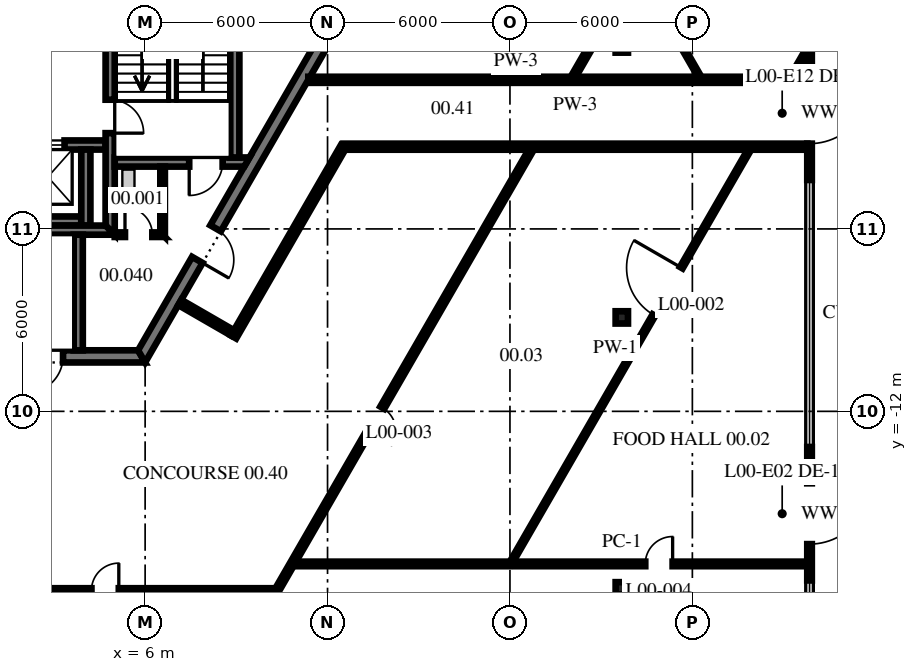
"""IFC4 building model, lengths in metres.
Left out: names, types, materials, properties, quantities, classifications, styles, units other than length and angle.
Written with IfcOpenShell. Run it as: python <this file> out.ifc"""

import sys

from ifc_helpers import new_model, si_unit, direction, frame, frame_2d, origin, origin_2d, place, context, subcontext, project, spatial, polyline, rectangle, i_section, outline, extrude, source, transform, mapped, element, fill, save


model = new_model("IFC4")
c1 = context("Model", 3, precision=1e-05, world=origin(), true_north=direction((0.0, 1.0)))
c2 = subcontext(c1, "Body", "Model", "MODEL_VIEW")
j1 = project(units=[si_unit("LENGTHUNIT", "METRE"), si_unit("PLANEANGLEUNIT", "RADIAN")], contexts=[c1])
p1 = place(None, origin())
s1 = spatial("IfcSite", under=j1, at=p1, CompositionType="ELEMENT")
p2 = place(p1, origin())
s2 = spatial("IfcBuilding", under=s1, at=p2, CompositionType="ELEMENT")
p3 = place(p2, origin())
s3 = spatial("IfcBuildingStorey", under=s2, at=p3, CompositionType="ELEMENT", Elevation=0.0)
m1 = source(origin(), c2, "Body", "SweptSolid", [
    extrude(i_section(OverallWidth=0.404, OverallDepth=0.406, WebThickness=0.027, FlangeThickness=0.044, at=origin_2d()), origin(), (0.0, 0.0, 1.0), 7.2),
])
for number, where, z_axis, x_axis in (
    (1, (21.679, -17.82, -0.2), (0.0, 0.0, 1.0), (0.0, 1.0, 0.0)),
    (2, (21.679, -8.91, -0.2), (0.0, 0.0, 1.0), (0.0, 1.0, 0.0)),
    (3, (21.679, 0.0, -0.2), (0.0, 0.0, 1.0), (0.0, 1.0, 0.0)),
):
    element("IfcColumn", number, at=place(p3, frame(where, z_axis=z_axis, x_axis=x_axis)), inside=s3, PredefinedType="COLUMN", context=c2, shape_type="MappedRepresentation", body=[
        mapped(m1, transform((0.0, 0.0, 0.0), scale=1.0)),
    ])
m2 = source(origin(), c2, "Body", "SweptSolid", [
    extrude(outline(polyline([(-0.115, -0.2), (11.885, -0.2), (11.654, 0.2), (0.115, 0.2), (-0.115, -0.2)])), origin(), (0.0, 0.0, 1.0), 7.0),
])
p4 = place(p3, frame((-5.885, -10.192, -0.2), z_axis=(0.0, 0.0, 1.0), x_axis=(1.0, 0.0, 0.0)))
e4 = element("IfcWall", 4, at=p4, inside=s3, PredefinedType="SHEAR", context=c2, shape_type="MappedRepresentation", body=[
    mapped(m2, transform((0.0, 0.0, 0.0), scale=1.0)),
])
p5 = place(p4, frame((7.985, 0.0, 0.2)))
e5 = element("IfcOpeningElement", 5, at=p5, cuts=e4, PredefinedType="OPENING", context=c2, shape_type="SweptSolid", body=[
    extrude(rectangle(XDim=1.2, YDim=2.1, at=frame_2d((0.6, 1.05))), frame((0.0, 0.21, 0.0), z_axis=(0.0, -1.0, 0.0), x_axis=(1.0, 0.0, 0.0)), (0.0, 0.0, 1.0), 0.42),
])
p6 = place(p3, frame((5.885, -10.192, -0.2), z_axis=(0.0, 0.0, 1.0), x_axis=(0.499996592174, 0.866027371285, 0.0)))
e6 = element("IfcWall", 6, at=p6, inside=s3, PredefinedType="SHEAR", context=c2, shape_type="MappedRepresentation", body=[
    mapped(m2, transform((0.0, 0.0, 0.0), scale=1.0)),
])
p7 = place(p6, frame((3.665, 0.0, 0.2)))
e7 = element("IfcOpeningElement", 7, at=p7, cuts=e6, PredefinedType="OPENING", context=c2, shape_type="SweptSolid", body=[
    extrude(rectangle(XDim=1.2, YDim=2.1, at=frame_2d((0.6, 1.05))), frame((0.0, 0.21, 0.0), z_axis=(0.0, -1.0, 0.0), x_axis=(1.0, 0.0, 0.0)), (0.0, 0.0, 1.0), 0.42),
])
p8 = place(p3, frame((-8.1, -3.24, -0.2), z_axis=(0.0, 0.0, 1.0), x_axis=(1.0, 0.0, 0.0)))
e8 = element("IfcWall", 8, at=p8, inside=s3, PredefinedType="SHEAR", context=c2, shape_type="SweptSolid", body=[
    extrude(rectangle(XDim=12.8, YDim=0.3, at=frame_2d((6.4, 0.0))), origin(), (0.0, 0.0, 1.0), 7.0),
])
p9 = place(p8, frame((1.613, 0.0, 0.2)))
e9 = element("IfcOpeningElement", 9, at=p9, cuts=e8, PredefinedType="OPENING", context=c2, shape_type="SweptSolid", body=[
    extrude(rectangle(XDim=0.9, YDim=2.1, at=frame_2d((0.45, 1.05))), frame((0.0, 0.16, 0.0), z_axis=(0.0, -1.0, 0.0), x_axis=(1.0, 0.0, 0.0)), (0.0, 0.0, 1.0), 0.32),
])
p10 = place(p8, frame((4.45, 0.0, 0.2)))
e10 = element("IfcOpeningElement", 10, at=p10, cuts=e8, PredefinedType="OPENING", context=c2, shape_type="SweptSolid", body=[
    extrude(rectangle(XDim=0.9, YDim=2.1, at=frame_2d((0.45, 1.05))), frame((0.0, 0.16, 0.0), z_axis=(0.0, -1.0, 0.0), x_axis=(1.0, 0.0, 0.0)), (0.0, 0.0, 1.0), 0.32),
])
p11 = place(p8, frame((7.288, 0.0, 0.2)))
e11 = element("IfcOpeningElement", 11, at=p11, cuts=e8, PredefinedType="OPENING", context=c2, shape_type="SweptSolid", body=[
    extrude(rectangle(XDim=0.9, YDim=2.1, at=frame_2d((0.45, 1.05))), frame((0.0, 0.16, 0.0), z_axis=(0.0, -1.0, 0.0), x_axis=(1.0, 0.0, 0.0)), (0.0, 0.0, 1.0), 0.32),
])
p12 = place(p8, frame((10.35, 0.0, 0.2)))
e12 = element("IfcOpeningElement", 12, at=p12, cuts=e8, PredefinedType="OPENING", context=c2, shape_type="SweptSolid", body=[
    extrude(rectangle(XDim=1.1, YDim=2.1, at=frame_2d((0.55, 1.05))), frame((0.0, 0.16, 0.0), z_axis=(0.0, -1.0, 0.0), x_axis=(1.0, 0.0, 0.0)), (0.0, 0.0, 1.0), 0.32),
])
p13 = place(p3, frame((-8.1, -5.74, -0.2), z_axis=(0.0, 0.0, 1.0), x_axis=(1.0, 0.0, 0.0)))
e13 = element("IfcWall", 13, at=p13, inside=s3, PredefinedType="SHEAR", context=c2, shape_type="SweptSolid", body=[
    extrude(outline(polyline([(12.0, -0.15), (-0.04, -0.15), (-0.213, 0.15), (12.0, 0.15), (12.0, -0.15)])), origin(), (0.0, 0.0, 1.0), 7.0),
])
m3 = source(origin(), c2, "Body", "SweptSolid", [
    extrude(rectangle(XDim=2.5, YDim=0.3, at=frame_2d((1.25, 0.0))), origin(), (0.0, 0.0, 1.0), 7.0),
])
p14 = place(p3, frame((4.05, -5.89, -0.2), z_axis=(0.0, 0.0, 1.0), x_axis=(0.0, 1.0, 0.0)))
e14 = element("IfcWall", 14, at=p14, inside=s3, PredefinedType="SHEAR", context=c2, shape_type="MappedRepresentation", body=[
    mapped(m3, transform((0.0, 0.0, 0.0), scale=1.0)),
])
p15 = place(p3, frame((4.85, -6.04, -0.2), z_axis=(0.0, 0.0, 1.0), x_axis=(0.0, 1.0, 0.0)))
e15 = element("IfcWall", 15, at=p15, inside=s3, PredefinedType="SHEAR", context=c2, shape_type="SweptSolid", body=[
    extrude(outline(polyline([(-0.15, -0.15), (9.99, -0.15), (9.99, 0.15), (0.15, 0.15), (-0.15, -0.15)])), origin(), (0.0, 0.0, 1.0), 7.0),
])
p16 = place(p15, frame((3.19, 0.0, 0.2)))
e16 = element("IfcOpeningElement", 16, at=p16, cuts=e15, PredefinedType="OPENING", context=c2, shape_type="SweptSolid", body=[
    extrude(rectangle(XDim=1.1, YDim=2.1, at=frame_2d((0.55, 1.05))), frame((0.0, 0.16, 0.0), z_axis=(0.0, -1.0, 0.0), x_axis=(1.0, 0.0, 0.0)), (0.0, 0.0, 1.0), 0.32),
])
p17 = place(p3, frame((5.0, -3.8, -0.2), z_axis=(0.0, 0.0, 1.0), x_axis=(1.0, 0.0, 0.0)))
e17 = element("IfcWall", 17, at=p17, inside=s3, PredefinedType="SHEAR", context=c2, shape_type="SweptSolid", body=[
    extrude(outline(polyline([(0.0, -0.15), (0.0, 0.15), (4.433, 0.15), (4.26, -0.15), (0.0, -0.15)])), origin(), (0.0, 0.0, 1.0), 7.0),
])
p18 = place(p17, frame((2.45, 0.0, 0.2)))
e18 = element("IfcOpeningElement", 18, at=p18, cuts=e17, PredefinedType="OPENING", context=c2, shape_type="SweptSolid", body=[
    extrude(rectangle(XDim=1.1, YDim=2.1, at=frame_2d((0.55, 1.05))), frame((0.0, 0.16, 0.0), z_axis=(0.0, -1.0, 0.0), x_axis=(1.0, 0.0, 0.0)), (0.0, 0.0, 1.0), 0.32),
])
p19 = place(p3, frame((8.95, -3.65, -0.2), z_axis=(0.0, 0.0, 1.0), x_axis=(0.0, 1.0, 0.0)))
e19 = element("IfcWall", 19, at=p19, inside=s3, PredefinedType="SHEAR", context=c2, shape_type="SweptSolid", body=[
    extrude(rectangle(XDim=7.3, YDim=0.3, at=frame_2d((3.65, 0.0))), origin(), (0.0, 0.0, 1.0), 7.0),
])
p20 = place(p3, frame((-3.95, -6.04, -0.2), z_axis=(0.0, 0.0, 1.0), x_axis=(1.0, 0.0, 0.0)))
e20 = element("IfcWall", 20, at=p20, inside=s3, PredefinedType="SHEAR", context=c2, shape_type="SweptSolid", body=[
    extrude(outline(polyline([(0.0, -0.15), (8.95, -0.15), (8.65, 0.15), (0.0, 0.15), (0.0, -0.15)])), origin(), (0.0, 0.0, 1.0), 7.0),
])
m4 = source(origin(), c2, "Body", "SweptSolid", [
    extrude(outline(polyline([(3.8, -0.15), (-0.004, -0.15), (-0.004, 0.15), (3.8, 0.15), (3.8, -0.15)])), origin(), (0.0, 0.0, 1.0), 7.0),
])
p21 = place(p3, frame((3.8, -9.99, -0.2), z_axis=(0.0, 0.0, 1.0), x_axis=(0.0, 1.0, 0.0)))
e21 = element("IfcWall", 21, at=p21, inside=s3, PredefinedType="SHEAR", context=c2, shape_type="MappedRepresentation", body=[
    mapped(m4, transform((0.0, 0.0, 0.0), scale=1.0)),
])
p22 = place(p3, frame((5.0, -6.19, 0.0), z_axis=(0.0, 0.0, 1.0), x_axis=(1.0, 0.0, 0.0)))
e22 = element("IfcWall", 22, at=p22, inside=s3, PredefinedType="PARTITIONING", context=c2, shape_type="SweptSolid", body=[
    extrude(outline(polyline([(0.0, -0.075), (1.65, -0.075), (1.5, 0.075), (0.0, 0.075), (0.0, -0.075)])), origin(), (0.0, 0.0, 1.0), 6.8),
])
p23 = place(p22, frame((0.337, 0.0, 0.0)))
e23 = element("IfcOpeningElement", 23, at=p23, cuts=e22, PredefinedType="OPENING", context=c2, shape_type="SweptSolid", body=[
    extrude(rectangle(XDim=0.9, YDim=2.1, at=frame_2d((0.45, 1.05))), frame((0.0, 0.085, 0.0), z_axis=(0.0, -1.0, 0.0), x_axis=(1.0, 0.0, 0.0)), (0.0, 0.0, 1.0), 0.17),
])
p24 = place(p3, frame((6.575, -6.19, 0.0), z_axis=(0.0, 0.0, 1.0), x_axis=(0.0, 1.0, 0.0)))
e24 = element("IfcWall", 24, at=p24, inside=s3, PredefinedType="PARTITIONING", context=c2, shape_type="SweptSolid", body=[
    extrude(outline(polyline([(-0.075, -0.075), (2.24, -0.075), (2.24, 0.075), (0.075, 0.075), (-0.075, -0.075)])), origin(), (0.0, 0.0, 1.0), 6.8),
])
m5 = source(origin(), c2, "Body", "SweptSolid", [
    extrude(rectangle(XDim=4.39, YDim=0.15, at=frame_2d((2.195, 0.0))), origin(), (0.0, 0.0, 1.0), 6.8),
])
p25 = place(p3, frame((27.854, -13.172, 0.0), z_axis=(0.0, 0.0, 1.0), x_axis=(0.0, -1.0, 0.0)))
e25 = element("IfcWall", 25, at=p25, inside=s3, PredefinedType="ELEMENTEDWALL", context=c2, shape_type="MappedRepresentation", body=[
    mapped(m5, transform((0.0, 0.0, 0.0), scale=1.0)),
])
p26 = place(p25, frame((1.195, 0.0, 0.0)))
e26 = element("IfcOpeningElement", 26, at=p26, cuts=e25, PredefinedType="OPENING", context=c2, shape_type="SweptSolid", body=[
    extrude(rectangle(XDim=2.0, YDim=2.7, at=frame_2d((1.0, 1.35))), frame((0.0, 0.085, 0.0), z_axis=(0.0, -1.0, 0.0), x_axis=(1.0, 0.0, 0.0)), (0.0, 0.0, 1.0), 0.17),
])
m6 = source(origin(), c2, "Body", "SweptSolid", [
    extrude(rectangle(XDim=4.391, YDim=0.15, at=frame_2d((2.195, 0.0))), origin(), (0.0, 0.0, 1.0), 6.8),
])
p27 = place(p3, frame((27.854, 0.0, 0.0), z_axis=(0.0, 0.0, 1.0), x_axis=(0.0, -1.0, 0.0)))
e27 = element("IfcWall", 27, at=p27, inside=s3, PredefinedType="ELEMENTEDWALL", context=c2, shape_type="MappedRepresentation", body=[
    mapped(m6, transform((0.0, 0.0, 0.0), scale=1.0)),
])
p28 = place(p27, frame((1.195, 0.0, 0.0)))
e28 = element("IfcOpeningElement", 28, at=p28, cuts=e27, PredefinedType="OPENING", context=c2, shape_type="SweptSolid", body=[
    extrude(rectangle(XDim=2.0, YDim=2.7, at=frame_2d((1.0, 1.35))), frame((0.0, 0.085, 0.0), z_axis=(0.0, -1.0, 0.0), x_axis=(1.0, 0.0, 0.0)), (0.0, 0.0, 1.0), 0.17),
])
p29 = place(p3, frame((12.747, 18.905, 0.0), z_axis=(0.0, 0.0, 1.0), x_axis=(0.500003565856, -0.866023345027, 0.0)))
e29 = element("IfcWall", 29, at=p29, inside=s3, PredefinedType="PARTITIONING", context=c2, shape_type="SweptSolid", body=[
    extrude(rectangle(XDim=22.979, YDim=0.1, at=frame_2d((11.49, 0.0))), origin(), (0.0, 0.0, 1.0), 6.8),
])
p30 = place(p29, frame((15.08, 0.0, 0.0)))
e30 = element("IfcOpeningElement", 30, at=p30, cuts=e29, PredefinedType="OPENING", context=c2, shape_type="SweptSolid", body=[
    extrude(rectangle(XDim=1.8, YDim=2.4, at=frame_2d((0.9, 1.2))), frame((0.0, 0.06, 0.0), z_axis=(0.0, -1.0, 0.0), x_axis=(1.0, 0.0, 0.0)), (0.0, 0.0, 1.0), 0.12),
])
p31 = place(p3, frame((-10.33, -17.892, 0.0), z_axis=(0.0, 0.0, 1.0), x_axis=(1.0, 0.0, 0.0)))
e31 = element("IfcWall", 31, at=p31, inside=s3, PredefinedType="PARTITIONING", context=c2, shape_type="SweptSolid", body=[
    extrude(rectangle(XDim=20.618, YDim=0.15, at=frame_2d((10.309, 0.0))), origin(), (0.0, 0.0, 1.0), 6.8),
])
p32 = place(p31, frame((1.05, 0.0, 0.0)))
e32 = element("IfcOpeningElement", 32, at=p32, cuts=e31, PredefinedType="OPENING", context=c2, shape_type="SweptSolid", body=[
    extrude(rectangle(XDim=0.9, YDim=2.1, at=frame_2d((0.45, 1.05))), frame((0.0, 0.085, 0.0), z_axis=(0.0, -1.0, 0.0), x_axis=(1.0, 0.0, 0.0)), (0.0, 0.0, 1.0), 0.17),
])
p33 = place(p31, frame((5.752, 0.0, 0.0)))
e33 = element("IfcOpeningElement", 33, at=p33, cuts=e31, PredefinedType="OPENING", context=c2, shape_type="SweptSolid", body=[
    extrude(rectangle(XDim=0.9, YDim=2.1, at=frame_2d((0.45, 1.05))), frame((0.0, 0.085, 0.0), z_axis=(0.0, -1.0, 0.0), x_axis=(1.0, 0.0, 0.0)), (0.0, 0.0, 1.0), 0.17),
])
p34 = place(p31, frame((14.564, 0.0, 0.0)))
e34 = element("IfcOpeningElement", 34, at=p34, cuts=e31, PredefinedType="OPENING", context=c2, shape_type="SweptSolid", body=[
    extrude(rectangle(XDim=0.9, YDim=2.1, at=frame_2d((0.45, 1.05))), frame((0.0, 0.085, 0.0), z_axis=(0.0, -1.0, 0.0), x_axis=(1.0, 0.0, 0.0)), (0.0, 0.0, 1.0), 0.17),
])
p35 = place(p3, frame((10.945, -17.018, 0.0), z_axis=(0.0, 0.0, 1.0), x_axis=(1.0, 0.0, 0.0)))
e35 = element("IfcWall", 35, at=p35, inside=s3, PredefinedType="PARTITIONING", context=c2, shape_type="SweptSolid", body=[
    extrude(rectangle(XDim=16.834, YDim=0.15, at=frame_2d((8.417, 0.0))), origin(), (0.0, 0.0, 1.0), 6.8),
])
p36 = place(p35, frame((11.506, 0.0, 0.0)))
e36 = element("IfcOpeningElement", 36, at=p36, cuts=e35, PredefinedType="OPENING", context=c2, shape_type="SweptSolid", body=[
    extrude(rectangle(XDim=0.9, YDim=2.1, at=frame_2d((0.45, 1.05))), frame((0.0, 0.085, 0.0), z_axis=(0.0, -1.0, 0.0), x_axis=(1.0, 0.0, 0.0)), (0.0, 0.0, 1.0), 0.17),
])
p37 = place(p3, frame((18.011, -17.018, 0.0), z_axis=(0.0, 0.0, 1.0), x_axis=(0.500016672517, 0.866015777688, 0.0)))
e37 = element("IfcWall", 37, at=p37, inside=s3, PredefinedType="PARTITIONING", context=c2, shape_type="SweptSolid", body=[
    extrude(rectangle(XDim=15.73, YDim=0.1, at=frame_2d((7.865, 0.0))), origin(), (0.0, 0.0, 1.0), 6.8),
])
p38 = place(p37, frame((9.45, 0.0, 0.0)))
e38 = element("IfcOpeningElement", 38, at=p38, cuts=e37, PredefinedType="OPENING", context=c2, shape_type="SweptSolid", body=[
    extrude(rectangle(XDim=1.8, YDim=2.4, at=frame_2d((0.9, 1.2))), frame((0.0, 0.06, 0.0), z_axis=(0.0, -1.0, 0.0), x_axis=(1.0, 0.0, 0.0)), (0.0, 0.0, 1.0), 0.12),
])
p39 = place(p3, frame((27.262, -0.995, 0.0), z_axis=(0.0, 0.0, 1.0), x_axis=(0.499962673433, 0.866046953215, 0.0)))
e39 = element("IfcWall", 39, at=p39, inside=s3, PredefinedType="PARTITIONING", context=c2, shape_type="SweptSolid", body=[
    extrude(rectangle(XDim=1.085, YDim=0.1, at=frame_2d((0.542, 0.0))), origin(), (0.0, 0.0, 1.0), 6.8),
])
p40 = place(p3, frame((10.331, -17.891, 0.0), z_axis=(0.0, 0.0, 1.0), x_axis=(0.499988868439, 0.866031830499, 0.0)))
e40 = element("IfcWall", 40, at=p40, inside=s3, PredefinedType="PARTITIONING", context=c2, shape_type="SweptSolid", body=[
    extrude(rectangle(XDim=16.738, YDim=0.15, at=frame_2d((8.369, 0.0))), origin(), (0.0, 0.0, 1.0), 6.8),
])
p41 = place(p40, frame((6.041, 0.0, 0.0)))
e41 = element("IfcOpeningElement", 41, at=p41, cuts=e40, PredefinedType="OPENING", context=c2, shape_type="SweptSolid", body=[
    extrude(rectangle(XDim=0.9, YDim=2.1, at=frame_2d((0.45, 1.05))), frame((0.0, 0.085, 0.0), z_axis=(0.0, -1.0, 0.0), x_axis=(1.0, 0.0, 0.0)), (0.0, 0.0, 1.0), 0.17),
])
p42 = place(p3, frame((20.085, -0.995, 0.0), z_axis=(0.0, 0.0, 1.0), x_axis=(0.500005339912, 0.866022320763, 0.0)))
e42 = element("IfcWall", 42, at=p42, inside=s3, PredefinedType="PARTITIONING", context=c2, shape_type="SweptSolid", body=[
    extrude(rectangle(XDim=1.121, YDim=0.15, at=frame_2d((0.56, 0.0))), origin(), (0.0, 0.0, 1.0), 6.8),
])
m7 = source(origin(), c2, "Body", "SweptSolid", [
    extrude(rectangle(XDim=2.0, YDim=0.2, at=frame_2d((1.0, 0.0))), origin(), (0.0, 0.0, 1.0), 6.8),
])
p43 = place(p3, frame((7.14, -8.418, 0.0), z_axis=(0.0, 0.0, 1.0), x_axis=(0.866041268327, -0.499972520799, 0.0)))
e43 = element("IfcWall", 43, at=p43, inside=s3, PredefinedType="PARTITIONING", context=c2, shape_type="MappedRepresentation", body=[
    mapped(m7, transform((0.0, 0.0, 0.0), scale=1.0)),
])
p44 = place(p3, frame((8.909, -9.554, 0.0), z_axis=(0.0, 0.0, 1.0), x_axis=(0.499986601258, 0.866033139413, 0.0)))
e44 = element("IfcWall", 44, at=p44, inside=s3, PredefinedType="PARTITIONING", context=c2, shape_type="SweptSolid", body=[
    extrude(rectangle(XDim=7.227, YDim=0.2, at=frame_2d((3.614, 0.0))), origin(), (0.0, 0.0, 1.0), 6.8),
])
p45 = place(p3, frame((12.522, -3.295, 0.0), z_axis=(0.0, 0.0, 1.0), x_axis=(1.0, 0.0, 0.0)))
e45 = element("IfcWall", 45, at=p45, inside=s3, PredefinedType="PARTITIONING", context=c2, shape_type="SweptSolid", body=[
    extrude(rectangle(XDim=15.258, YDim=0.2, at=frame_2d((7.629, 0.0))), origin(), (0.0, 0.0, 1.0), 6.8),
])
p46 = place(p3, frame((11.368, -1.095, 0.0), z_axis=(0.0, 0.0, 1.0), x_axis=(1.0, 0.0, 0.0)))
e46 = element("IfcWall", 46, at=p46, inside=s3, PredefinedType="PARTITIONING", context=c2, shape_type="SweptSolid", body=[
    extrude(rectangle(XDim=16.412, YDim=0.2, at=frame_2d((8.206, 0.0))), origin(), (0.0, 0.0, 1.0), 6.8),
])
p47 = place(p5, frame((1.2, 0.0, 0.0), z_axis=(0.0, 0.0, 1.0), x_axis=(-1.0, 0.0, 0.0)))
e47 = element("IfcDoor", 47, at=p47, inside=s3, OperationType="SINGLE_SWING_RIGHT", PredefinedType="DOOR", context=c2, shape_type="SweptSolid", body=[
    extrude(rectangle(XDim=1.2, YDim=2.1, at=frame_2d((0.6, 1.05))), frame((0.0, 0.025, 0.0), z_axis=(0.0, -1.0, 0.0), x_axis=(1.0, 0.0, 0.0)), (0.0, 0.0, 1.0), 0.05),
])
fill(e5, e47)
p48 = place(p7, frame((1.2, 0.0, 0.0), z_axis=(0.0, 0.0, 1.0), x_axis=(-1.0, 0.0, 0.0)))
e48 = element("IfcDoor", 48, at=p48, inside=s3, OperationType="SINGLE_SWING_RIGHT", PredefinedType="DOOR", context=c2, shape_type="SweptSolid", body=[
    extrude(rectangle(XDim=1.2, YDim=2.1, at=frame_2d((0.6, 1.05))), frame((0.0, 0.025, 0.0), z_axis=(0.0, -1.0, 0.0), x_axis=(1.0, 0.0, 0.0)), (0.0, 0.0, 1.0), 0.05),
])
fill(e7, e48)
p49 = place(p16, frame((1.1, 0.0, 0.0), z_axis=(0.0, 0.0, 1.0), x_axis=(-1.0, 0.0, 0.0)))
e49 = element("IfcDoor", 49, at=p49, inside=s3, OperationType="SINGLE_SWING_RIGHT", PredefinedType="DOOR", context=c2, shape_type="SweptSolid", body=[
    extrude(rectangle(XDim=1.1, YDim=2.1, at=frame_2d((0.55, 1.05))), frame((0.0, 0.025, 0.0), z_axis=(0.0, -1.0, 0.0), x_axis=(1.0, 0.0, 0.0)), (0.0, 0.0, 1.0), 0.05),
])
fill(e16, e49)
p50 = place(p18, frame((1.1, 0.0, 0.0), z_axis=(0.0, 0.0, 1.0), x_axis=(-1.0, 0.0, 0.0)))
e50 = element("IfcDoor", 50, at=p50, inside=s3, OperationType="SINGLE_SWING_RIGHT", PredefinedType="DOOR", context=c2, shape_type="SweptSolid", body=[
    extrude(rectangle(XDim=1.1, YDim=2.1, at=frame_2d((0.55, 1.05))), frame((0.0, 0.025, 0.0), z_axis=(0.0, -1.0, 0.0), x_axis=(1.0, 0.0, 0.0)), (0.0, 0.0, 1.0), 0.05),
])
fill(e18, e50)
p51 = place(p23, origin())
e51 = element("IfcDoor", 51, at=p51, inside=s3, OperationType="SINGLE_SWING_LEFT", PredefinedType="DOOR", context=c2, shape_type="SweptSolid", body=[
    extrude(rectangle(XDim=0.9, YDim=2.1, at=frame_2d((0.45, 1.05))), frame((0.0, 0.025, 0.0), z_axis=(0.0, -1.0, 0.0), x_axis=(1.0, 0.0, 0.0)), (0.0, 0.0, 1.0), 0.05),
])
fill(e23, e51)
p52 = place(p12, origin())
e52 = element("IfcDoor", 52, at=p52, inside=s3, OperationType="DOUBLE_DOOR_SLIDING", PredefinedType="DOOR", context=c2, shape_type="SweptSolid", body=[
    extrude(rectangle(XDim=1.1, YDim=2.1, at=frame_2d((0.55, 1.05))), frame((0.0, 0.025, 0.0), z_axis=(0.0, -1.0, 0.0), x_axis=(1.0, 0.0, 0.0)), (0.0, 0.0, 1.0), 0.05),
])
fill(e12, e52)
p53 = place(p26, origin())
e53 = element("IfcDoor", 53, at=p53, inside=s3, OperationType="DOUBLE_DOOR_SINGLE_SWING", PredefinedType="DOOR", context=c2, shape_type="SweptSolid", body=[
    extrude(rectangle(XDim=2.0, YDim=2.7, at=frame_2d((1.0, 1.35))), frame((0.0, 0.025, 0.0), z_axis=(0.0, -1.0, 0.0), x_axis=(1.0, 0.0, 0.0)), (0.0, 0.0, 1.0), 0.05),
])
fill(e26, e53)
p54 = place(p28, origin())
e54 = element("IfcDoor", 54, at=p54, inside=s3, OperationType="DOUBLE_DOOR_SINGLE_SWING", PredefinedType="DOOR", context=c2, shape_type="SweptSolid", body=[
    extrude(rectangle(XDim=2.0, YDim=2.7, at=frame_2d((1.0, 1.35))), frame((0.0, 0.025, 0.0), z_axis=(0.0, -1.0, 0.0), x_axis=(1.0, 0.0, 0.0)), (0.0, 0.0, 1.0), 0.05),
])
fill(e28, e54)
p55 = place(p38, origin())
e55 = element("IfcDoor", 55, at=p55, inside=s3, OperationType="DOUBLE_DOOR_SINGLE_SWING", PredefinedType="DOOR", context=c2, shape_type="SweptSolid", body=[
    extrude(rectangle(XDim=1.8, YDim=2.4, at=frame_2d((0.9, 1.2))), frame((0.0, 0.025, 0.0), z_axis=(0.0, -1.0, 0.0), x_axis=(1.0, 0.0, 0.0)), (0.0, 0.0, 1.0), 0.05),
])
fill(e38, e55)
p56 = place(p41, origin())
e56 = element("IfcDoor", 56, at=p56, inside=s3, OperationType="SINGLE_SWING_RIGHT", PredefinedType="DOOR", context=c2, shape_type="SweptSolid", body=[
    extrude(rectangle(XDim=0.9, YDim=2.1, at=frame_2d((0.45, 1.05))), frame((0.0, 0.025, 0.0), z_axis=(0.0, -1.0, 0.0), x_axis=(1.0, 0.0, 0.0)), (0.0, 0.0, 1.0), 0.05),
])
fill(e41, e56)
p57 = place(p36, origin())
e57 = element("IfcDoor", 57, at=p57, inside=s3, OperationType="SINGLE_SWING_LEFT", PredefinedType="DOOR", context=c2, shape_type="SweptSolid", body=[
    extrude(rectangle(XDim=0.9, YDim=2.1, at=frame_2d((0.45, 1.05))), frame((0.0, 0.025, 0.0), z_axis=(0.0, -1.0, 0.0), x_axis=(1.0, 0.0, 0.0)), (0.0, 0.0, 1.0), 0.05),
])
fill(e36, e57)
p58 = place(p34, origin())
e58 = element("IfcDoor", 58, at=p58, inside=s3, OperationType="SINGLE_SWING_LEFT", PredefinedType="DOOR", context=c2, shape_type="SweptSolid", body=[
    extrude(rectangle(XDim=0.9, YDim=2.1, at=frame_2d((0.45, 1.05))), frame((0.0, 0.025, 0.0), z_axis=(0.0, -1.0, 0.0), x_axis=(1.0, 0.0, 0.0)), (0.0, 0.0, 1.0), 0.05),
])
fill(e34, e58)
save(model, sys.argv[1])
